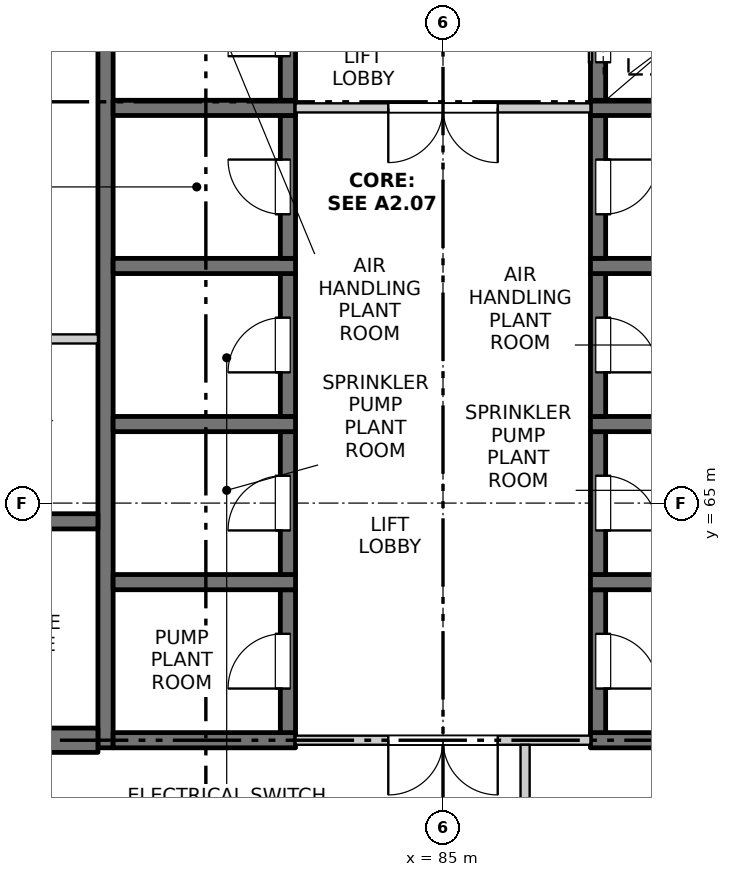
"""IFC4 building model, lengths in metres.
Left out: names, types, materials, properties, quantities, classifications, styles, units other than length and angle.
Written with IfcOpenShell. Run it as: python <this file> out.ifc"""

import sys

from ifc_helpers import new_model, si_unit, direction, frame, frame_2d, origin, place, context, subcontext, project, spatial, rectangle, extrude, element, fill, save


model = new_model("IFC4")
c1 = context("Model", 3, precision=1e-05, world=origin(), true_north=direction((0.0, 1.0)))
c2 = subcontext(c1, "Body", "Model", "MODEL_VIEW")
j1 = project(units=[si_unit("LENGTHUNIT", "METRE"), si_unit("PLANEANGLEUNIT", "RADIAN")], contexts=[c1])
p1 = place(None, origin())
s1 = spatial("IfcSite", under=j1, at=p1, CompositionType="ELEMENT")
p2 = place(p1, origin())
s2 = spatial("IfcBuilding", under=s1, at=p2, CompositionType="ELEMENT")
p3 = place(p2, frame((0.0, 0.0, 241.5)))
s3 = spatial("IfcBuildingStorey", under=s2, at=p3, CompositionType="ELEMENT", Elevation=241.5)
p4 = place(p3, frame((79.45, 60.975, -0.3), z_axis=(0.0, 0.0, 1.0), x_axis=(0.0, 1.0, 0.0)))
e1 = element("IfcWall", 1, at=p4, inside=s3, PredefinedType="SOLIDWALL", context=c2, shape_type="SweptSolid", body=[
    extrude(rectangle(XDim=16.325, YDim=0.25, at=frame_2d((8.163, 0.0))), origin(), (0.0, 0.0, 1.0), 4.5),
])
p5 = place(p3, frame((79.575, 61.1, -0.3), z_axis=(0.0, 0.0, 1.0), x_axis=(1.0, 0.0, 0.0)))
e2 = element("IfcWall", 2, at=p5, inside=s3, PredefinedType="SOLIDWALL", context=c2, shape_type="SweptSolid", body=[
    extrude(rectangle(XDim=3.0, YDim=0.25, at=frame_2d((1.5, 0.0))), origin(), (0.0, 0.0, 1.0), 4.5),
])
p6 = place(p3, frame((82.45, 61.225, -0.3), z_axis=(0.0, 0.0, 1.0), x_axis=(0.0, 1.0, 0.0)))
e3 = element("IfcWall", 3, at=p6, inside=s3, PredefinedType="SOLIDWALL", context=c2, shape_type="SweptSolid", body=[
    extrude(rectangle(XDim=2.35, YDim=0.25, at=frame_2d((1.175, 0.0))), origin(), (0.0, 0.0, 1.0), 4.5),
])
p7 = place(p6, frame((0.725, 0.0, 0.3)))
e4 = element("IfcOpeningElement", 4, at=p7, cuts=e3, PredefinedType="OPENING", context=c2, shape_type="SweptSolid", body=[
    extrude(rectangle(XDim=0.9, YDim=2.1, at=frame_2d((0.45, 1.05))), frame((0.0, 0.135, 0.0), z_axis=(0.0, -1.0, 0.0), x_axis=(1.0, 0.0, 0.0)), (0.0, 0.0, 1.0), 0.27),
])
p8 = place(p3, frame((79.575, 63.7, -0.3), z_axis=(0.0, 0.0, 1.0), x_axis=(1.0, 0.0, 0.0)))
e5 = element("IfcWall", 5, at=p8, inside=s3, PredefinedType="SOLIDWALL", context=c2, shape_type="SweptSolid", body=[
    extrude(rectangle(XDim=3.0, YDim=0.25, at=frame_2d((1.5, 0.0))), origin(), (0.0, 0.0, 1.0), 4.5),
])
p9 = place(p3, frame((82.45, 63.825, -0.3), z_axis=(0.0, 0.0, 1.0), x_axis=(0.0, 1.0, 0.0)))
e6 = element("IfcWall", 6, at=p9, inside=s3, PredefinedType="SOLIDWALL", context=c2, shape_type="SweptSolid", body=[
    extrude(rectangle(XDim=2.35, YDim=0.25, at=frame_2d((1.175, 0.0))), origin(), (0.0, 0.0, 1.0), 4.5),
])
p10 = place(p9, frame((0.725, 0.0, 0.3)))
e7 = element("IfcOpeningElement", 7, at=p10, cuts=e6, PredefinedType="OPENING", context=c2, shape_type="SweptSolid", body=[
    extrude(rectangle(XDim=0.9, YDim=2.1, at=frame_2d((0.45, 1.05))), frame((0.0, 0.135, 0.0), z_axis=(0.0, -1.0, 0.0), x_axis=(1.0, 0.0, 0.0)), (0.0, 0.0, 1.0), 0.27),
])
p11 = place(p3, frame((79.575, 66.3, -0.3), z_axis=(0.0, 0.0, 1.0), x_axis=(1.0, 0.0, 0.0)))
e8 = element("IfcWall", 8, at=p11, inside=s3, PredefinedType="SOLIDWALL", context=c2, shape_type="SweptSolid", body=[
    extrude(rectangle(XDim=3.0, YDim=0.25, at=frame_2d((1.5, 0.0))), origin(), (0.0, 0.0, 1.0), 4.5),
])
p12 = place(p3, frame((82.45, 66.425, -0.3), z_axis=(0.0, 0.0, 1.0), x_axis=(0.0, 1.0, 0.0)))
e9 = element("IfcWall", 9, at=p12, inside=s3, PredefinedType="SOLIDWALL", context=c2, shape_type="SweptSolid", body=[
    extrude(rectangle(XDim=2.35, YDim=0.25, at=frame_2d((1.175, 0.0))), origin(), (0.0, 0.0, 1.0), 4.5),
])
p13 = place(p12, frame((0.725, 0.0, 0.3)))
e10 = element("IfcOpeningElement", 10, at=p13, cuts=e9, PredefinedType="OPENING", context=c2, shape_type="SweptSolid", body=[
    extrude(rectangle(XDim=0.9, YDim=2.1, at=frame_2d((0.45, 1.05))), frame((0.0, 0.135, 0.0), z_axis=(0.0, -1.0, 0.0), x_axis=(1.0, 0.0, 0.0)), (0.0, 0.0, 1.0), 0.27),
])
p14 = place(p3, frame((79.575, 68.9, -0.3), z_axis=(0.0, 0.0, 1.0), x_axis=(1.0, 0.0, 0.0)))
e11 = element("IfcWall", 11, at=p14, inside=s3, PredefinedType="SOLIDWALL", context=c2, shape_type="SweptSolid", body=[
    extrude(rectangle(XDim=3.0, YDim=0.25, at=frame_2d((1.5, 0.0))), origin(), (0.0, 0.0, 1.0), 4.5),
])
p15 = place(p3, frame((82.45, 69.025, -0.3), z_axis=(0.0, 0.0, 1.0), x_axis=(0.0, 1.0, 0.0)))
e12 = element("IfcWall", 12, at=p15, inside=s3, PredefinedType="SOLIDWALL", context=c2, shape_type="SweptSolid", body=[
    extrude(rectangle(XDim=2.35, YDim=0.25, at=frame_2d((1.175, 0.0))), origin(), (0.0, 0.0, 1.0), 4.5),
])
p16 = place(p15, frame((0.725, 0.0, 0.3)))
e13 = element("IfcOpeningElement", 13, at=p16, cuts=e12, PredefinedType="OPENING", context=c2, shape_type="SweptSolid", body=[
    extrude(rectangle(XDim=0.9, YDim=2.1, at=frame_2d((0.45, 1.05))), frame((0.0, 0.135, 0.0), z_axis=(0.0, -1.0, 0.0), x_axis=(1.0, 0.0, 0.0)), (0.0, 0.0, 1.0), 0.27),
])
p17 = place(p3, frame((79.575, 71.5, -0.3), z_axis=(0.0, 0.0, 1.0), x_axis=(1.0, 0.0, 0.0)))
e14 = element("IfcWall", 14, at=p17, inside=s3, PredefinedType="SOLIDWALL", context=c2, shape_type="SweptSolid", body=[
    extrude(rectangle(XDim=3.0, YDim=0.25, at=frame_2d((1.5, 0.0))), origin(), (0.0, 0.0, 1.0), 4.5),
])
p18 = place(p3, frame((82.45, 71.625, -0.3), z_axis=(0.0, 0.0, 1.0), x_axis=(0.0, 1.0, 0.0)))
e15 = element("IfcWall", 15, at=p18, inside=s3, PredefinedType="SOLIDWALL", context=c2, shape_type="SweptSolid", body=[
    extrude(rectangle(XDim=2.35, YDim=0.25, at=frame_2d((1.175, 0.0))), origin(), (0.0, 0.0, 1.0), 4.5),
])
p19 = place(p18, frame((0.725, 0.0, 0.3)))
e16 = element("IfcOpeningElement", 16, at=p19, cuts=e15, PredefinedType="OPENING", context=c2, shape_type="SweptSolid", body=[
    extrude(rectangle(XDim=0.9, YDim=2.1, at=frame_2d((0.45, 1.05))), frame((0.0, 0.135, 0.0), z_axis=(0.0, -1.0, 0.0), x_axis=(1.0, 0.0, 0.0)), (0.0, 0.0, 1.0), 0.27),
])
p20 = place(p3, frame((87.425, 61.1, -0.3), z_axis=(0.0, 0.0, 1.0), x_axis=(1.0, 0.0, 0.0)))
e17 = element("IfcWall", 17, at=p20, inside=s3, PredefinedType="SOLIDWALL", context=c2, shape_type="SweptSolid", body=[
    extrude(rectangle(XDim=3.0, YDim=0.25, at=frame_2d((1.5, 0.0))), origin(), (0.0, 0.0, 1.0), 4.5),
])
p21 = place(p3, frame((87.55, 61.225, -0.3), z_axis=(0.0, 0.0, 1.0), x_axis=(0.0, 1.0, 0.0)))
e18 = element("IfcWall", 18, at=p21, inside=s3, PredefinedType="SOLIDWALL", context=c2, shape_type="SweptSolid", body=[
    extrude(rectangle(XDim=2.35, YDim=0.25, at=frame_2d((1.175, 0.0))), origin(), (0.0, 0.0, 1.0), 4.5),
])
p22 = place(p21, frame((0.725, 0.0, 0.3)))
e19 = element("IfcOpeningElement", 19, at=p22, cuts=e18, PredefinedType="OPENING", context=c2, shape_type="SweptSolid", body=[
    extrude(rectangle(XDim=0.9, YDim=2.1, at=frame_2d((0.45, 1.05))), frame((0.0, 0.135, 0.0), z_axis=(0.0, -1.0, 0.0), x_axis=(1.0, 0.0, 0.0)), (0.0, 0.0, 1.0), 0.27),
])
p23 = place(p3, frame((87.425, 63.7, -0.3), z_axis=(0.0, 0.0, 1.0), x_axis=(1.0, 0.0, 0.0)))
e20 = element("IfcWall", 20, at=p23, inside=s3, PredefinedType="SOLIDWALL", context=c2, shape_type="SweptSolid", body=[
    extrude(rectangle(XDim=3.0, YDim=0.25, at=frame_2d((1.5, 0.0))), origin(), (0.0, 0.0, 1.0), 4.5),
])
p24 = place(p3, frame((87.55, 63.825, -0.3), z_axis=(0.0, 0.0, 1.0), x_axis=(0.0, 1.0, 0.0)))
e21 = element("IfcWall", 21, at=p24, inside=s3, PredefinedType="SOLIDWALL", context=c2, shape_type="SweptSolid", body=[
    extrude(rectangle(XDim=2.35, YDim=0.25, at=frame_2d((1.175, 0.0))), origin(), (0.0, 0.0, 1.0), 4.5),
])
p25 = place(p24, frame((0.725, 0.0, 0.3)))
e22 = element("IfcOpeningElement", 22, at=p25, cuts=e21, PredefinedType="OPENING", context=c2, shape_type="SweptSolid", body=[
    extrude(rectangle(XDim=0.9, YDim=2.1, at=frame_2d((0.45, 1.05))), frame((0.0, 0.135, 0.0), z_axis=(0.0, -1.0, 0.0), x_axis=(1.0, 0.0, 0.0)), (0.0, 0.0, 1.0), 0.27),
])
p26 = place(p3, frame((87.425, 66.3, -0.3), z_axis=(0.0, 0.0, 1.0), x_axis=(1.0, 0.0, 0.0)))
e23 = element("IfcWall", 23, at=p26, inside=s3, PredefinedType="SOLIDWALL", context=c2, shape_type="SweptSolid", body=[
    extrude(rectangle(XDim=3.0, YDim=0.25, at=frame_2d((1.5, 0.0))), origin(), (0.0, 0.0, 1.0), 4.5),
])
p27 = place(p3, frame((87.55, 66.425, -0.3), z_axis=(0.0, 0.0, 1.0), x_axis=(0.0, 1.0, 0.0)))
e24 = element("IfcWall", 24, at=p27, inside=s3, PredefinedType="SOLIDWALL", context=c2, shape_type="SweptSolid", body=[
    extrude(rectangle(XDim=2.35, YDim=0.25, at=frame_2d((1.175, 0.0))), origin(), (0.0, 0.0, 1.0), 4.5),
])
p28 = place(p27, frame((0.725, 0.0, 0.3)))
e25 = element("IfcOpeningElement", 25, at=p28, cuts=e24, PredefinedType="OPENING", context=c2, shape_type="SweptSolid", body=[
    extrude(rectangle(XDim=0.9, YDim=2.1, at=frame_2d((0.45, 1.05))), frame((0.0, 0.135, 0.0), z_axis=(0.0, -1.0, 0.0), x_axis=(1.0, 0.0, 0.0)), (0.0, 0.0, 1.0), 0.27),
])
p29 = place(p3, frame((87.425, 68.9, -0.3), z_axis=(0.0, 0.0, 1.0), x_axis=(1.0, 0.0, 0.0)))
e26 = element("IfcWall", 26, at=p29, inside=s3, PredefinedType="SOLIDWALL", context=c2, shape_type="SweptSolid", body=[
    extrude(rectangle(XDim=3.0, YDim=0.25, at=frame_2d((1.5, 0.0))), origin(), (0.0, 0.0, 1.0), 4.5),
])
p30 = place(p3, frame((87.55, 69.025, -0.3), z_axis=(0.0, 0.0, 1.0), x_axis=(0.0, 1.0, 0.0)))
e27 = element("IfcWall", 27, at=p30, inside=s3, PredefinedType="SOLIDWALL", context=c2, shape_type="SweptSolid", body=[
    extrude(rectangle(XDim=2.35, YDim=0.25, at=frame_2d((1.175, 0.0))), origin(), (0.0, 0.0, 1.0), 4.5),
])
p31 = place(p30, frame((0.725, 0.0, 0.3)))
e28 = element("IfcOpeningElement", 28, at=p31, cuts=e27, PredefinedType="OPENING", context=c2, shape_type="SweptSolid", body=[
    extrude(rectangle(XDim=0.9, YDim=2.1, at=frame_2d((0.45, 1.05))), frame((0.0, 0.135, 0.0), z_axis=(0.0, -1.0, 0.0), x_axis=(1.0, 0.0, 0.0)), (0.0, 0.0, 1.0), 0.27),
])
p32 = place(p3, frame((87.425, 71.5, -0.3), z_axis=(0.0, 0.0, 1.0), x_axis=(1.0, 0.0, 0.0)))
e29 = element("IfcWall", 29, at=p32, inside=s3, PredefinedType="SOLIDWALL", context=c2, shape_type="SweptSolid", body=[
    extrude(rectangle(XDim=3.0, YDim=0.25, at=frame_2d((1.5, 0.0))), origin(), (0.0, 0.0, 1.0), 4.5),
])
p33 = place(p3, frame((87.55, 71.625, -0.3), z_axis=(0.0, 0.0, 1.0), x_axis=(0.0, 1.0, 0.0)))
e30 = element("IfcWall", 30, at=p33, inside=s3, PredefinedType="SOLIDWALL", context=c2, shape_type="SweptSolid", body=[
    extrude(rectangle(XDim=2.35, YDim=0.25, at=frame_2d((1.175, 0.0))), origin(), (0.0, 0.0, 1.0), 4.5),
])
p34 = place(p33, frame((0.625, 0.0, 0.3)))
e31 = element("IfcOpeningElement", 31, at=p34, cuts=e30, PredefinedType="OPENING", context=c2, shape_type="SweptSolid", body=[
    extrude(rectangle(XDim=1.1, YDim=2.1, at=frame_2d((0.55, 1.05))), frame((0.0, 0.135, 0.0), z_axis=(0.0, -1.0, 0.0), x_axis=(1.0, 0.0, 0.0)), (0.0, 0.0, 1.0), 0.27),
])
p35 = place(p3, frame((75.45, 61.1, -0.3), z_axis=(0.0, 0.0, 1.0), x_axis=(1.0, 0.0, 0.0)))
e32 = element("IfcWall", 32, at=p35, inside=s3, PredefinedType="SOLIDWALL", context=c2, shape_type="SweptSolid", body=[
    extrude(rectangle(XDim=3.875, YDim=0.4, at=frame_2d((1.938, 0.0))), origin(), (0.0, 0.0, 1.0), 4.5),
])
p36 = place(p3, frame((75.45, 64.7, -0.3), z_axis=(0.0, 0.0, 1.0), x_axis=(1.0, 0.0, 0.0)))
e33 = element("IfcWall", 33, at=p36, inside=s3, PredefinedType="SOLIDWALL", context=c2, shape_type="SweptSolid", body=[
    extrude(rectangle(XDim=3.875, YDim=0.25, at=frame_2d((1.938, 0.0))), origin(), (0.0, 0.0, 1.0), 4.5),
])
p37 = place(p3, frame((82.575, 61.1, 0.0), z_axis=(0.0, 0.0, 1.0), x_axis=(1.0, 0.0, 0.0)))
e34 = element("IfcWall", 34, at=p37, inside=s3, PredefinedType="PARTITIONING", context=c2, shape_type="SweptSolid", body=[
    extrude(rectangle(XDim=4.85, YDim=0.15, at=frame_2d((2.425, 0.0))), origin(), (0.0, 0.0, 1.0), 4.2),
])
p38 = place(p37, frame((1.525, 0.0, 0.0)))
e35 = element("IfcOpeningElement", 35, at=p38, cuts=e34, PredefinedType="OPENING", context=c2, shape_type="SweptSolid", body=[
    extrude(rectangle(XDim=1.8, YDim=2.1, at=frame_2d((0.9, 1.05))), frame((0.0, 0.085, 0.0), z_axis=(0.0, -1.0, 0.0), x_axis=(1.0, 0.0, 0.0)), (0.0, 0.0, 1.0), 0.17),
])
p39 = place(p3, frame((75.45, 67.7, 0.0), z_axis=(0.0, 0.0, 1.0), x_axis=(1.0, 0.0, 0.0)))
e36 = element("IfcWall", 36, at=p39, inside=s3, PredefinedType="PARTITIONING", context=c2, shape_type="SweptSolid", body=[
    extrude(rectangle(XDim=3.875, YDim=0.15, at=frame_2d((1.938, 0.0))), origin(), (0.0, 0.0, 1.0), 4.2),
])
p40 = place(p3, frame((82.575, 71.5, 0.0), z_axis=(0.0, 0.0, 1.0), x_axis=(1.0, 0.0, 0.0)))
e37 = element("IfcWall", 37, at=p40, inside=s3, PredefinedType="PARTITIONING", context=c2, shape_type="SweptSolid", body=[
    extrude(rectangle(XDim=4.85, YDim=0.15, at=frame_2d((2.425, 0.0))), origin(), (0.0, 0.0, 1.0), 4.2),
])
p41 = place(p40, frame((1.525, 0.0, 0.0)))
e38 = element("IfcOpeningElement", 38, at=p41, cuts=e37, PredefinedType="OPENING", context=c2, shape_type="SweptSolid", body=[
    extrude(rectangle(XDim=1.8, YDim=2.1, at=frame_2d((0.9, 1.05))), frame((0.0, 0.085, 0.0), z_axis=(0.0, -1.0, 0.0), x_axis=(1.0, 0.0, 0.0)), (0.0, 0.0, 1.0), 0.17),
])
p42 = place(p3, frame((86.35, 55.45, 0.0), z_axis=(0.0, 0.0, 1.0), x_axis=(0.0, 1.0, 0.0)))
e39 = element("IfcWall", 39, at=p42, inside=s3, PredefinedType="PARTITIONING", context=c2, shape_type="SweptSolid", body=[
    extrude(rectangle(XDim=5.575, YDim=0.15, at=frame_2d((2.788, 0.0))), origin(), (0.0, 0.0, 1.0), 4.2),
])
p43 = place(p42, frame((2.25, 0.0, 0.0)))
e40 = element("IfcOpeningElement", 40, at=p43, cuts=e39, PredefinedType="OPENING", context=c2, shape_type="SweptSolid", body=[
    extrude(rectangle(XDim=0.9, YDim=2.1, at=frame_2d((0.45, 1.05))), frame((0.0, 0.085, 0.0), z_axis=(0.0, -1.0, 0.0), x_axis=(1.0, 0.0, 0.0)), (0.0, 0.0, 1.0), 0.17),
])
p44 = place(p38, origin())
e41 = element("IfcDoor", 41, at=p44, inside=s3, OperationType="DOUBLE_DOOR_SINGLE_SWING", PredefinedType="DOOR", context=c2, shape_type="SweptSolid", body=[
    extrude(rectangle(XDim=1.8, YDim=2.1, at=frame_2d((0.9, 1.05))), frame((0.0, 0.025, 0.0), z_axis=(0.0, -1.0, 0.0), x_axis=(1.0, 0.0, 0.0)), (0.0, 0.0, 1.0), 0.05),
])
fill(e35, e41)
p45 = place(p7, origin())
e42 = element("IfcDoor", 42, at=p45, inside=s3, OperationType="SINGLE_SWING_LEFT", PredefinedType="DOOR", context=c2, shape_type="SweptSolid", body=[
    extrude(rectangle(XDim=0.9, YDim=2.1, at=frame_2d((0.45, 1.05))), frame((0.0, 0.11, 0.0), z_axis=(0.0, -1.0, 0.0), x_axis=(1.0, 0.0, 0.0)), (0.0, 0.0, 1.0), 0.05),
])
fill(e4, e42)
p46 = place(p22, origin())
e43 = element("IfcDoor", 43, at=p46, inside=s3, OperationType="SINGLE_SWING_RIGHT", PredefinedType="DOOR", context=c2, shape_type="SweptSolid", body=[
    extrude(rectangle(XDim=0.9, YDim=2.1, at=frame_2d((0.45, 1.05))), frame((0.0, -0.06, 0.0), z_axis=(0.0, -1.0, 0.0), x_axis=(1.0, 0.0, 0.0)), (0.0, 0.0, 1.0), 0.05),
])
fill(e19, e43)
p47 = place(p10, origin())
e44 = element("IfcDoor", 44, at=p47, inside=s3, OperationType="SINGLE_SWING_LEFT", PredefinedType="DOOR", context=c2, shape_type="SweptSolid", body=[
    extrude(rectangle(XDim=0.9, YDim=2.1, at=frame_2d((0.45, 1.05))), frame((0.0, 0.11, 0.0), z_axis=(0.0, -1.0, 0.0), x_axis=(1.0, 0.0, 0.0)), (0.0, 0.0, 1.0), 0.05),
])
fill(e7, e44)
p48 = place(p25, origin())
e45 = element("IfcDoor", 45, at=p48, inside=s3, OperationType="SINGLE_SWING_RIGHT", PredefinedType="DOOR", context=c2, shape_type="SweptSolid", body=[
    extrude(rectangle(XDim=0.9, YDim=2.1, at=frame_2d((0.45, 1.05))), frame((0.0, -0.06, 0.0), z_axis=(0.0, -1.0, 0.0), x_axis=(1.0, 0.0, 0.0)), (0.0, 0.0, 1.0), 0.05),
])
fill(e22, e45)
p49 = place(p13, origin())
e46 = element("IfcDoor", 46, at=p49, inside=s3, OperationType="SINGLE_SWING_LEFT", PredefinedType="DOOR", context=c2, shape_type="SweptSolid", body=[
    extrude(rectangle(XDim=0.9, YDim=2.1, at=frame_2d((0.45, 1.05))), frame((0.0, 0.11, 0.0), z_axis=(0.0, -1.0, 0.0), x_axis=(1.0, 0.0, 0.0)), (0.0, 0.0, 1.0), 0.05),
])
fill(e10, e46)
p50 = place(p28, origin())
e47 = element("IfcDoor", 47, at=p50, inside=s3, OperationType="SINGLE_SWING_RIGHT", PredefinedType="DOOR", context=c2, shape_type="SweptSolid", body=[
    extrude(rectangle(XDim=0.9, YDim=2.1, at=frame_2d((0.45, 1.05))), frame((0.0, -0.06, 0.0), z_axis=(0.0, -1.0, 0.0), x_axis=(1.0, 0.0, 0.0)), (0.0, 0.0, 1.0), 0.05),
])
fill(e25, e47)
p51 = place(p16, origin())
e48 = element("IfcDoor", 48, at=p51, inside=s3, OperationType="SINGLE_SWING_RIGHT", PredefinedType="DOOR", context=c2, shape_type="SweptSolid", body=[
    extrude(rectangle(XDim=0.9, YDim=2.1, at=frame_2d((0.45, 1.05))), frame((0.0, 0.11, 0.0), z_axis=(0.0, -1.0, 0.0), x_axis=(1.0, 0.0, 0.0)), (0.0, 0.0, 1.0), 0.05),
])
fill(e13, e48)
p52 = place(p31, origin())
e49 = element("IfcDoor", 49, at=p52, inside=s3, OperationType="SINGLE_SWING_LEFT", PredefinedType="DOOR", context=c2, shape_type="SweptSolid", body=[
    extrude(rectangle(XDim=0.9, YDim=2.1, at=frame_2d((0.45, 1.05))), frame((0.0, -0.06, 0.0), z_axis=(0.0, -1.0, 0.0), x_axis=(1.0, 0.0, 0.0)), (0.0, 0.0, 1.0), 0.05),
])
fill(e28, e49)
p53 = place(p41, origin())
e50 = element("IfcDoor", 50, at=p53, inside=s3, OperationType="DOUBLE_DOOR_SINGLE_SWING", PredefinedType="DOOR", context=c2, shape_type="SweptSolid", body=[
    extrude(rectangle(XDim=1.8, YDim=2.1, at=frame_2d((0.9, 1.05))), frame((0.0, 0.025, 0.0), z_axis=(0.0, -1.0, 0.0), x_axis=(1.0, 0.0, 0.0)), (0.0, 0.0, 1.0), 0.05),
])
fill(e38, e50)
p54 = place(p19, origin())
e51 = element("IfcDoor", 51, at=p54, inside=s3, OperationType="SINGLE_SWING_LEFT", PredefinedType="DOOR", context=c2, shape_type="SweptSolid", body=[
    extrude(rectangle(XDim=0.9, YDim=2.1, at=frame_2d((0.45, 1.05))), frame((0.0, 0.11, 0.0), z_axis=(0.0, -1.0, 0.0), x_axis=(1.0, 0.0, 0.0)), (0.0, 0.0, 1.0), 0.05),
])
fill(e16, e51)
p55 = place(p34, origin())
e52 = element("IfcDoor", 52, at=p55, inside=s3, OperationType="SLIDING_TO_LEFT", PredefinedType="DOOR", context=c2, shape_type="SweptSolid", body=[
    extrude(rectangle(XDim=1.1, YDim=2.1, at=frame_2d((0.55, 1.05))), frame((0.0, -0.06, 0.0), z_axis=(0.0, -1.0, 0.0), x_axis=(1.0, 0.0, 0.0)), (0.0, 0.0, 1.0), 0.05),
])
fill(e31, e52)
save(model, sys.argv[1])
